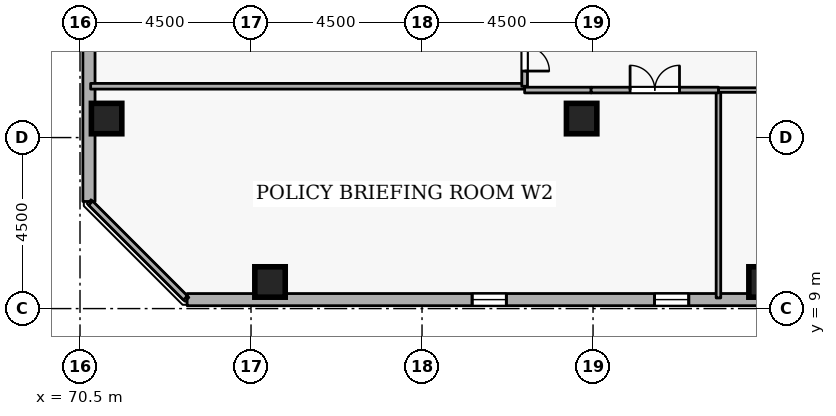
"""IFC4 building model, lengths in metres.
Left out: names, types, materials, properties, quantities, classifications, styles, units other than length and angle.
Written with IfcOpenShell. Run it as: python <this file> out.ifc"""

import sys

from ifc_helpers import new_model, si_unit, direction, frame, frame_2d, origin, origin_2d, place, context, subcontext, project, spatial, rectangle, extrude, element, fill, save


model = new_model("IFC4")
c1 = context("Model", 3, precision=1e-05, world=origin(), true_north=direction((0.0, 1.0)))
c2 = subcontext(c1, "Body", "Model", "MODEL_VIEW")
j1 = project(units=[si_unit("LENGTHUNIT", "METRE"), si_unit("PLANEANGLEUNIT", "RADIAN")], contexts=[c1])
p1 = place(None, origin())
s1 = spatial("IfcSite", under=j1, at=p1, CompositionType="ELEMENT")
p2 = place(p1, origin())
s2 = spatial("IfcBuilding", under=s1, at=p2, CompositionType="ELEMENT")
p3 = place(p2, frame((0.0, 0.0, 265.5)))
s3 = spatial("IfcBuildingStorey", under=s2, at=p3, CompositionType="ELEMENT", Elevation=265.5)
for number, where, z_axis, x_axis in (
    (1, (71.2, 14.0, 0.0), (0.0, 0.0, 1.0), (1.0, 0.0, 0.0)),
    (2, (88.5, 9.7, 0.0), (0.0, 0.0, 1.0), (1.0, 0.0, 0.0)),
    (3, (75.5, 9.7, 0.0), (0.0, 0.0, 1.0), (1.0, 0.0, 0.0)),
    (4, (83.7, 14.0, 0.0), (0.0, 0.0, 1.0), (1.0, 0.0, 0.0)),
):
    element("IfcColumn", number, at=place(p3, frame(where, z_axis=z_axis, x_axis=x_axis)), inside=s3, PredefinedType="COLUMN", context=c2, shape_type="SweptSolid", body=[
        extrude(rectangle(XDim=0.8, YDim=0.8, at=origin_2d()), origin(), (0.0, 0.0, 1.0), 3.6),
    ])
p4 = place(p3, frame((73.319, 9.235, 0.0), z_axis=(0.0, 0.0, 1.0), x_axis=(0.999999997144, 7.5574884e-05, 0.0)))
e5 = element("IfcWall", 5, at=p4, inside=s3, PredefinedType="STANDARD", context=c2, shape_type="SweptSolid", body=[
    extrude(rectangle(XDim=35.535, YDim=0.32, at=frame_2d((17.768, 0.0))), origin(), (0.0, 0.0, 1.0), 2.7),
])
p5 = place(p4, frame((7.5, 0.0, 0.72)))
e6 = element("IfcOpeningElement", 6, at=p5, cuts=e5, PredefinedType="OPENING", context=c2, shape_type="SweptSolid", body=[
    extrude(rectangle(XDim=0.9, YDim=1.75, at=frame_2d((0.45, 0.875))), frame((0.0, 0.17, 0.0), z_axis=(0.0, -1.0, 0.0), x_axis=(1.0, 0.0, 0.0)), (0.0, 0.0, 1.0), 0.34),
])
p6 = place(p4, frame((12.3, 0.0, 0.72)))
e7 = element("IfcOpeningElement", 7, at=p6, cuts=e5, PredefinedType="OPENING", context=c2, shape_type="SweptSolid", body=[
    extrude(rectangle(XDim=0.9, YDim=1.75, at=frame_2d((0.45, 0.875))), frame((0.0, 0.17, 0.0), z_axis=(0.0, -1.0, 0.0), x_axis=(1.0, 0.0, 0.0)), (0.0, 0.0, 1.0), 0.34),
])
p7 = place(p4, frame((17.1, 0.0, 0.72)))
e8 = element("IfcOpeningElement", 8, at=p7, cuts=e5, PredefinedType="OPENING", context=c2, shape_type="SweptSolid", body=[
    extrude(rectangle(XDim=0.9, YDim=1.75, at=frame_2d((0.45, 0.875))), frame((0.0, 0.17, 0.0), z_axis=(0.0, -1.0, 0.0), x_axis=(1.0, 0.0, 0.0)), (0.0, 0.0, 1.0), 0.34),
])
p8 = place(p4, frame((21.9, 0.0, 0.72)))
e9 = element("IfcOpeningElement", 9, at=p8, cuts=e5, PredefinedType="OPENING", context=c2, shape_type="SweptSolid", body=[
    extrude(rectangle(XDim=0.9, YDim=1.75, at=frame_2d((0.45, 0.875))), frame((0.0, 0.17, 0.0), z_axis=(0.0, -1.0, 0.0), x_axis=(1.0, 0.0, 0.0)), (0.0, 0.0, 1.0), 0.34),
])
p9 = place(p4, frame((31.5, 0.0, 0.72)))
e10 = element("IfcOpeningElement", 10, at=p9, cuts=e5, PredefinedType="OPENING", context=c2, shape_type="SweptSolid", body=[
    extrude(rectangle(XDim=0.9, YDim=1.75, at=frame_2d((0.45, 0.875))), frame((0.0, 0.17, 0.0), z_axis=(0.0, -1.0, 0.0), x_axis=(1.0, 0.0, 0.0)), (0.0, 0.0, 1.0), 0.34),
])
p10 = place(p3, frame((70.738, 47.354, 0.0), z_axis=(0.0, 0.0, 1.0), x_axis=(-7.5574884e-05, -0.999999997144, 0.0)))
e11 = element("IfcWall", 11, at=p10, inside=s3, PredefinedType="STANDARD", context=c2, shape_type="SweptSolid", body=[
    extrude(rectangle(XDim=35.535, YDim=0.32, at=frame_2d((17.768, 0.0))), origin(), (0.0, 0.0, 1.0), 2.7),
])
p11 = place(p10, frame((2.7, 0.0, 0.72)))
e12 = element("IfcOpeningElement", 12, at=p11, cuts=e11, PredefinedType="OPENING", context=c2, shape_type="SweptSolid", body=[
    extrude(rectangle(XDim=0.9, YDim=1.75, at=frame_2d((0.45, 0.875))), frame((0.0, 0.17, 0.0), z_axis=(0.0, -1.0, 0.0), x_axis=(1.0, 0.0, 0.0)), (0.0, 0.0, 1.0), 0.34),
])
p12 = place(p10, frame((12.3, 0.0, 0.72)))
e13 = element("IfcOpeningElement", 13, at=p12, cuts=e11, PredefinedType="OPENING", context=c2, shape_type="SweptSolid", body=[
    extrude(rectangle(XDim=0.9, YDim=1.75, at=frame_2d((0.45, 0.875))), frame((0.0, 0.17, 0.0), z_axis=(0.0, -1.0, 0.0), x_axis=(1.0, 0.0, 0.0)), (0.0, 0.0, 1.0), 0.34),
])
p13 = place(p10, frame((17.1, 0.0, 0.72)))
e14 = element("IfcOpeningElement", 14, at=p13, cuts=e11, PredefinedType="OPENING", context=c2, shape_type="SweptSolid", body=[
    extrude(rectangle(XDim=0.9, YDim=1.75, at=frame_2d((0.45, 0.875))), frame((0.0, 0.17, 0.0), z_axis=(0.0, -1.0, 0.0), x_axis=(1.0, 0.0, 0.0)), (0.0, 0.0, 1.0), 0.34),
])
p14 = place(p10, frame((21.9, 0.0, 0.72)))
e15 = element("IfcOpeningElement", 15, at=p14, cuts=e11, PredefinedType="OPENING", context=c2, shape_type="SweptSolid", body=[
    extrude(rectangle(XDim=0.9, YDim=1.75, at=frame_2d((0.45, 0.875))), frame((0.0, 0.17, 0.0), z_axis=(0.0, -1.0, 0.0), x_axis=(1.0, 0.0, 0.0)), (0.0, 0.0, 1.0), 0.34),
])
p15 = place(p10, frame((26.7, 0.0, 0.72)))
e16 = element("IfcOpeningElement", 16, at=p15, cuts=e11, PredefinedType="OPENING", context=c2, shape_type="SweptSolid", body=[
    extrude(rectangle(XDim=0.9, YDim=1.75, at=frame_2d((0.45, 0.875))), frame((0.0, 0.17, 0.0), z_axis=(0.0, -1.0, 0.0), x_axis=(1.0, 0.0, 0.0)), (0.0, 0.0, 1.0), 0.34),
])
p16 = place(p3, frame((82.2, 14.85, 0.0), z_axis=(0.0, 0.0, 1.0), x_axis=(-1.0, 0.0, 0.0)))
e17 = element("IfcWall", 17, at=p16, inside=s3, PredefinedType="PARTITIONING", context=c2, shape_type="SweptSolid", body=[
    extrude(rectangle(XDim=11.42, YDim=0.15, at=frame_2d((5.71, 0.0))), origin(), (0.0, 0.0, 1.0), 3.34),
])
p17 = place(p3, frame((82.2, 16.95, 0.0), z_axis=(0.0, 0.0, 1.0), x_axis=(0.0, -1.0, 0.0)))
e18 = element("IfcWall", 18, at=p17, inside=s3, PredefinedType="PARTITIONING", context=c2, shape_type="SweptSolid", body=[
    extrude(rectangle(XDim=2.1, YDim=0.15, at=frame_2d((1.05, 0.0))), origin(), (0.0, 0.0, 1.0), 3.34),
])
p18 = place(p17, frame((0.4, 0.0, 0.0)))
e19 = element("IfcOpeningElement", 19, at=p18, cuts=e18, PredefinedType="OPENING", context=c2, shape_type="SweptSolid", body=[
    extrude(rectangle(XDim=1.3, YDim=2.12, at=frame_2d((0.65, 1.06))), frame((0.0, 0.085, 0.0), z_axis=(0.0, -1.0, 0.0), x_axis=(1.0, 0.0, 0.0)), (0.0, 0.0, 1.0), 0.17),
])
p19 = place(p3, frame((87.3, 9.28, 0.0), z_axis=(0.0, 0.0, 1.0), x_axis=(0.0, 1.0, 0.0)))
e20 = element("IfcWall", 20, at=p19, inside=s3, PredefinedType="PARTITIONING", context=c2, shape_type="SweptSolid", body=[
    extrude(rectangle(XDim=5.47, YDim=0.12, at=frame_2d((2.735, 0.0))), origin(), (0.0, 0.0, 1.0), 3.34),
])
p20 = place(p3, frame((87.3, 14.75, 0.0), z_axis=(0.0, 0.0, 1.0), x_axis=(1.0, 0.0, 0.0)))
e21 = element("IfcWall", 21, at=p20, inside=s3, PredefinedType="PARTITIONING", context=c2, shape_type="SweptSolid", body=[
    extrude(rectangle(XDim=5.75, YDim=0.12, at=frame_2d((2.875, 0.0))), origin(), (0.0, 0.0, 1.0), 3.34),
])
p21 = place(p20, frame((2.35, 0.0, 0.0)))
e22 = element("IfcOpeningElement", 22, at=p21, cuts=e21, PredefinedType="OPENING", context=c2, shape_type="SweptSolid", body=[
    extrude(rectangle(XDim=1.05, YDim=2.1, at=frame_2d((0.525, 1.05))), frame((0.0, 0.07, 0.0), z_axis=(0.0, -1.0, 0.0), x_axis=(1.0, 0.0, 0.0)), (0.0, 0.0, 1.0), 0.14),
])
p22 = place(p3, frame((73.275, 9.28, 0.0), z_axis=(0.0, 0.0, 1.0), x_axis=(-0.707106781187, 0.707106781187, 0.0)))
e23 = element("IfcWall", 23, at=p22, inside=s3, PredefinedType="PARTITIONING", context=c2, shape_type="SweptSolid", body=[
    extrude(rectangle(XDim=3.528, YDim=0.15, at=frame_2d((1.764, 0.0))), origin(), (0.0, 0.0, 1.0), 3.34),
])
p23 = place(p3, frame((82.2, 14.75, 0.0), z_axis=(0.0, 0.0, 1.0), x_axis=(1.0, 0.0, 0.0)))
e24 = element("IfcWall", 24, at=p23, inside=s3, PredefinedType="PARTITIONING", context=c2, shape_type="SweptSolid", body=[
    extrude(rectangle(XDim=1.75, YDim=0.15, at=frame_2d((0.875, 0.0))), origin(), (0.0, 0.0, 1.0), 3.34),
])
p24 = place(p3, frame((83.95, 14.75, 0.0), z_axis=(0.0, 0.0, 1.0), x_axis=(1.0, 0.0, 0.0)))
e25 = element("IfcWall", 25, at=p24, inside=s3, PredefinedType="PARTITIONING", context=c2, shape_type="SweptSolid", body=[
    extrude(rectangle(XDim=3.35, YDim=0.15, at=frame_2d((1.675, 0.0))), origin(), (0.0, 0.0, 1.0), 3.34),
])
p25 = place(p24, frame((1.025, 0.0, 0.0)))
e26 = element("IfcOpeningElement", 26, at=p25, cuts=e25, PredefinedType="OPENING", context=c2, shape_type="SweptSolid", body=[
    extrude(rectangle(XDim=1.3, YDim=2.12, at=frame_2d((0.65, 1.06))), frame((0.0, 0.085, 0.0), z_axis=(0.0, -1.0, 0.0), x_axis=(1.0, 0.0, 0.0)), (0.0, 0.0, 1.0), 0.17),
])
p26 = place(p5, origin())
e27 = element("IfcWindow", 27, at=p26, inside=s3, PartitioningType="SINGLE_PANEL", PredefinedType="WINDOW", context=c2, shape_type="SweptSolid", body=[
    extrude(rectangle(XDim=0.9, YDim=1.75, at=frame_2d((0.45, 0.875))), frame((0.0, 0.03, 0.0), z_axis=(0.0, -1.0, 0.0), x_axis=(1.0, 0.0, 0.0)), (0.0, 0.0, 1.0), 0.06),
])
fill(e6, e27)
p27 = place(p6, origin())
e28 = element("IfcWindow", 28, at=p27, inside=s3, PartitioningType="SINGLE_PANEL", PredefinedType="WINDOW", context=c2, shape_type="SweptSolid", body=[
    extrude(rectangle(XDim=0.9, YDim=1.75, at=frame_2d((0.45, 0.875))), frame((0.0, 0.03, 0.0), z_axis=(0.0, -1.0, 0.0), x_axis=(1.0, 0.0, 0.0)), (0.0, 0.0, 1.0), 0.06),
])
fill(e7, e28)
p28 = place(p18, origin())
e29 = element("IfcDoor", 29, at=p28, inside=s3, OperationType="DOUBLE_DOOR_SINGLE_SWING", PredefinedType="DOOR", context=c2, shape_type="SweptSolid", body=[
    extrude(rectangle(XDim=1.3, YDim=2.12, at=frame_2d((0.65, 1.06))), frame((0.0, 0.025, 0.0), z_axis=(0.0, -1.0, 0.0), x_axis=(1.0, 0.0, 0.0)), (0.0, 0.0, 1.0), 0.05),
])
fill(e19, e29)
p29 = place(p25, origin())
e30 = element("IfcDoor", 30, at=p29, inside=s3, OperationType="DOUBLE_DOOR_SINGLE_SWING", PredefinedType="DOOR", context=c2, shape_type="SweptSolid", body=[
    extrude(rectangle(XDim=1.3, YDim=2.12, at=frame_2d((0.65, 1.06))), frame((0.0, 0.025, 0.0), z_axis=(0.0, -1.0, 0.0), x_axis=(1.0, 0.0, 0.0)), (0.0, 0.0, 1.0), 0.05),
])
fill(e26, e30)
save(model, sys.argv[1])
